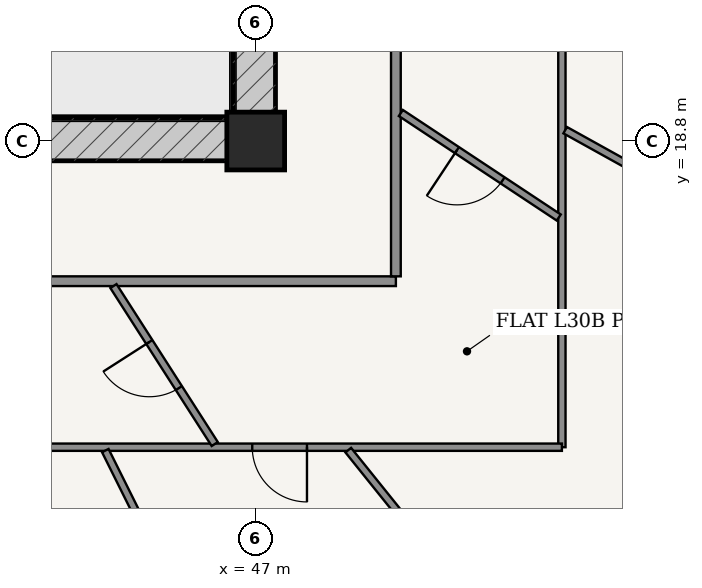
"""IFC4 building model, lengths in metres.
Left out: names, types, materials, properties, quantities, classifications, styles, units other than length and angle.
Written with IfcOpenShell. Run it as: python <this file> out.ifc"""

import sys

from ifc_helpers import new_model, si_unit, direction, frame, frame_2d, origin, origin_2d, place, context, subcontext, project, spatial, rectangle, extrude, source, transform, mapped, element, fill, save


model = new_model("IFC4")
c1 = context("Model", 3, precision=1e-05, world=origin(), true_north=direction((-0.2419218956, 0.970295726276)))
c2 = subcontext(c1, "Body", "Model", "MODEL_VIEW")
j1 = project(units=[si_unit("LENGTHUNIT", "METRE"), si_unit("PLANEANGLEUNIT", "RADIAN")], contexts=[c1])
p1 = place(None, origin())
s1 = spatial("IfcSite", under=j1, at=p1, CompositionType="ELEMENT")
p2 = place(p1, origin())
s2 = spatial("IfcBuilding", under=s1, at=p2, CompositionType="ELEMENT")
p3 = place(p2, frame((0.0, 0.0, 115.8)))
s3 = spatial("IfcBuildingStorey", under=s2, at=p3, CompositionType="ELEMENT", Elevation=115.8)
p4 = place(p3, frame((47.0, 18.8, 0.0), z_axis=(0.0, 0.0, 1.0), x_axis=(1.0, 0.0, 0.0)))
e1 = element("IfcColumn", 1, at=p4, inside=s3, PredefinedType="COLUMN", context=c2, shape_type="SweptSolid", body=[
    extrude(rectangle(XDim=0.95, YDim=0.95, at=origin_2d()), origin(), (0.0, 0.0, 1.0), 3.6),
])
p5 = place(p3, frame((28.675, 18.825, 0.0), z_axis=(0.0, 0.0, 1.0), x_axis=(1.0, 0.0, 0.0)))
e2 = element("IfcWall", 2, at=p5, inside=s3, PredefinedType="SHEAR", context=c2, shape_type="SweptSolid", body=[
    extrude(rectangle(XDim=18.65, YDim=0.7, at=frame_2d((9.325, 0.0))), origin(), (0.0, 0.0, 1.0), 3.325),
])
p6 = place(p5, frame((7.577, 0.0, 0.0)))
e3 = element("IfcOpeningElement", 3, at=p6, cuts=e2, PredefinedType="OPENING", context=c2, shape_type="SweptSolid", body=[
    extrude(rectangle(XDim=0.85, YDim=2.1, at=frame_2d((0.425, 1.05))), frame((0.0, 0.36, 0.0), z_axis=(0.0, -1.0, 0.0), x_axis=(1.0, 0.0, 0.0)), (0.0, 0.0, 1.0), 0.72),
])
p7 = place(p5, frame((10.623, 0.0, 0.0)))
e4 = element("IfcOpeningElement", 4, at=p7, cuts=e2, PredefinedType="OPENING", context=c2, shape_type="SweptSolid", body=[
    extrude(rectangle(XDim=0.85, YDim=2.1, at=frame_2d((0.425, 1.05))), frame((0.0, 0.36, 0.0), z_axis=(0.0, -1.0, 0.0), x_axis=(1.0, 0.0, 0.0)), (0.0, 0.0, 1.0), 0.72),
])
p8 = place(p3, frame((46.975, 19.175, 0.0), z_axis=(0.0, 0.0, 1.0), x_axis=(0.0, 1.0, 0.0)))
e5 = element("IfcWall", 5, at=p8, inside=s3, PredefinedType="SHEAR", context=c2, shape_type="SweptSolid", body=[
    extrude(rectangle(XDim=15.25, YDim=0.7, at=frame_2d((7.625, 0.0))), origin(), (0.0, 0.0, 1.0), 3.325),
])
p9 = place(p8, frame((9.875, 0.0, 0.0)))
e6 = element("IfcOpeningElement", 6, at=p9, cuts=e5, PredefinedType="OPENING", context=c2, shape_type="SweptSolid", body=[
    extrude(rectangle(XDim=1.5, YDim=2.2, at=frame_2d((0.75, 1.1))), frame((0.0, 0.36, 0.0), z_axis=(0.0, -1.0, 0.0), x_axis=(1.0, 0.0, 0.0)), (0.0, 0.0, 1.0), 0.72),
])
p10 = place(p3, frame((52.7, 8.398, 0.0), z_axis=(0.0, 0.0, 1.0), x_axis=(0.769254958887, 0.638941944333, 0.0)))
e7 = element("IfcWall", 7, at=p10, inside=s3, PredefinedType="SOLIDWALL", context=c2, shape_type="SweptSolid", body=[
    extrude(rectangle(XDim=9.69, YDim=0.28, at=frame_2d((4.845, 0.0))), origin(), (0.0, 0.0, 1.0), 3.325),
])
p11 = place(p10, frame((1.566, 0.0, 0.85)))
e8 = element("IfcOpeningElement", 8, at=p11, cuts=e7, PredefinedType="OPENING", context=c2, shape_type="SweptSolid", body=[
    extrude(rectangle(XDim=2.1, YDim=1.95, at=frame_2d((1.05, 0.975))), frame((0.0, 0.15, 0.0), z_axis=(0.0, -1.0, 0.0), x_axis=(1.0, 0.0, 0.0)), (0.0, 0.0, 1.0), 0.3),
])
p12 = place(p10, frame((6.023, 0.0, 0.85)))
e9 = element("IfcOpeningElement", 9, at=p12, cuts=e7, PredefinedType="OPENING", context=c2, shape_type="SweptSolid", body=[
    extrude(rectangle(XDim=2.1, YDim=1.95, at=frame_2d((1.05, 0.975))), frame((0.0, 0.15, 0.0), z_axis=(0.0, -1.0, 0.0), x_axis=(1.0, 0.0, 0.0)), (0.0, 0.0, 1.0), 0.3),
])
p13 = place(p3, frame((26.695, 16.495, 0.0), z_axis=(0.0, 0.0, 1.0), x_axis=(1.0, 0.0, 0.0)))
e10 = element("IfcWall", 10, at=p13, inside=s3, PredefinedType="PARTITIONING", context=c2, shape_type="SweptSolid", body=[
    extrude(rectangle(XDim=22.61, YDim=0.16, at=frame_2d((11.305, 0.0))), origin(), (0.0, 0.0, 1.0), 2.767),
])
p14 = place(p3, frame((49.305, 16.575, 0.0), z_axis=(0.0, 0.0, 1.0), x_axis=(0.0, 1.0, 0.0)))
e11 = element("IfcWall", 11, at=p14, inside=s3, PredefinedType="PARTITIONING", context=c2, shape_type="SweptSolid", body=[
    extrude(rectangle(XDim=20.45, YDim=0.16, at=frame_2d((10.225, 0.0))), origin(), (0.0, 0.0, 1.0), 2.767),
])
p15 = place(p14, frame((17.046, 0.0, 0.0)))
e12 = element("IfcOpeningElement", 12, at=p15, cuts=e11, PredefinedType="OPENING", context=c2, shape_type="SweptSolid", body=[
    extrude(rectangle(XDim=0.98, YDim=2.2, at=frame_2d((0.49, 1.1))), frame((0.0, 0.09, 0.0), z_axis=(0.0, -1.0, 0.0), x_axis=(1.0, 0.0, 0.0)), (0.0, 0.0, 1.0), 0.18),
])
p16 = place(p3, frame((52.035, 39.835, 0.0), z_axis=(0.0, 0.0, 1.0), x_axis=(0.0, -1.0, 0.0)))
e13 = element("IfcWall", 13, at=p16, inside=s3, PredefinedType="PARTITIONING", context=c2, shape_type="SweptSolid", body=[
    extrude(rectangle(XDim=26.07, YDim=0.12, at=frame_2d((13.035, 0.0))), origin(), (0.0, 0.0, 1.0), 2.767),
])
p17 = place(p16, frame((3.362, 0.0, 0.0)))
e14 = element("IfcOpeningElement", 14, at=p17, cuts=e13, PredefinedType="OPENING", context=c2, shape_type="SweptSolid", body=[
    extrude(rectangle(XDim=0.9, YDim=2.15, at=frame_2d((0.45, 1.075))), frame((0.0, 0.07, 0.0), z_axis=(0.0, -1.0, 0.0), x_axis=(1.0, 0.0, 0.0)), (0.0, 0.0, 1.0), 0.14),
])
p18 = place(p16, frame((13.924, 0.0, 0.0)))
e15 = element("IfcOpeningElement", 15, at=p18, cuts=e13, PredefinedType="OPENING", context=c2, shape_type="SweptSolid", body=[
    extrude(rectangle(XDim=0.9, YDim=2.15, at=frame_2d((0.45, 1.075))), frame((0.0, 0.07, 0.0), z_axis=(0.0, -1.0, 0.0), x_axis=(1.0, 0.0, 0.0)), (0.0, 0.0, 1.0), 0.14),
])
p19 = place(p3, frame((52.035, 13.765, 0.0), z_axis=(0.0, 0.0, 1.0), x_axis=(-1.0, 0.0, 0.0)))
e16 = element("IfcWall", 16, at=p19, inside=s3, PredefinedType="PARTITIONING", context=c2, shape_type="SweptSolid", body=[
    extrude(rectangle(XDim=24.416, YDim=0.12, at=frame_2d((12.208, 0.0))), origin(), (0.0, 0.0, 1.0), 2.767),
])
p20 = place(p19, frame((4.192, 0.0, 0.0)))
e17 = element("IfcOpeningElement", 17, at=p20, cuts=e16, PredefinedType="OPENING", context=c2, shape_type="SweptSolid", body=[
    extrude(rectangle(XDim=0.9, YDim=2.15, at=frame_2d((0.45, 1.075))), frame((0.0, 0.07, 0.0), z_axis=(0.0, -1.0, 0.0), x_axis=(1.0, 0.0, 0.0)), (0.0, 0.0, 1.0), 0.14),
])
p21 = place(p19, frame((19.728, 0.0, 0.0)))
e18 = element("IfcOpeningElement", 18, at=p21, cuts=e16, PredefinedType="OPENING", context=c2, shape_type="SweptSolid", body=[
    extrude(rectangle(XDim=0.86, YDim=2.15, at=frame_2d((0.43, 1.075))), frame((0.0, 0.07, 0.0), z_axis=(0.0, -1.0, 0.0), x_axis=(1.0, 0.0, 0.0)), (0.0, 0.0, 1.0), 0.14),
])
p22 = place(p3, frame((44.526, 13.709, 0.0), z_axis=(0.0, 0.0, 1.0), x_axis=(0.446179583353, -0.894943450392, 0.0)))
e19 = element("IfcWall", 19, at=p22, inside=s3, PredefinedType="PARTITIONING", context=c2, shape_type="SweptSolid", body=[
    extrude(rectangle(XDim=8.125, YDim=0.12, at=frame_2d((4.062, 0.0))), origin(), (0.0, 0.0, 1.0), 2.767),
])
p23 = place(p22, frame((3.612, 0.0, 0.0)))
e20 = element("IfcOpeningElement", 20, at=p23, cuts=e19, PredefinedType="OPENING", context=c2, shape_type="SweptSolid", body=[
    extrude(rectangle(XDim=0.9, YDim=2.15, at=frame_2d((0.45, 1.075))), frame((0.0, 0.07, 0.0), z_axis=(0.0, -1.0, 0.0), x_axis=(1.0, 0.0, 0.0)), (0.0, 0.0, 1.0), 0.14),
])
p24 = place(p3, frame((48.522, 13.717, 0.0), z_axis=(0.0, 0.0, 1.0), x_axis=(0.626707979732, -0.77925419995, 0.0)))
e21 = element("IfcWall", 21, at=p24, inside=s3, PredefinedType="PARTITIONING", context=c2, shape_type="SweptSolid", body=[
    extrude(rectangle(XDim=6.679, YDim=0.12, at=frame_2d((3.339, 0.0))), origin(), (0.0, 0.0, 1.0), 2.767),
])
p25 = place(p24, frame((1.821, 0.0, 0.0)))
e22 = element("IfcOpeningElement", 22, at=p25, cuts=e21, PredefinedType="OPENING", context=c2, shape_type="SweptSolid", body=[
    extrude(rectangle(XDim=0.9, YDim=2.15, at=frame_2d((0.45, 1.075))), frame((0.0, 0.07, 0.0), z_axis=(0.0, -1.0, 0.0), x_axis=(1.0, 0.0, 0.0)), (0.0, 0.0, 1.0), 0.14),
])
p26 = place(p3, frame((52.089, 18.979, 0.0), z_axis=(0.0, 0.0, 1.0), x_axis=(0.874313476423, -0.485361664066, 0.0)))
e23 = element("IfcWall", 23, at=p26, inside=s3, PredefinedType="PARTITIONING", context=c2, shape_type="SweptSolid", body=[
    extrude(rectangle(XDim=9.066, YDim=0.12, at=frame_2d((4.533, 0.0))), origin(), (0.0, 0.0, 1.0), 2.767),
])
p27 = place(p3, frame((52.094, 21.95, 0.0), z_axis=(0.0, 0.0, 1.0), x_axis=(0.945573120726, -0.32540970078, 0.0)))
e24 = element("IfcWall", 24, at=p27, inside=s3, PredefinedType="PARTITIONING", context=c2, shape_type="SweptSolid", body=[
    extrude(rectangle(XDim=11.022, YDim=0.12, at=frame_2d((5.511, 0.0))), origin(), (0.0, 0.0, 1.0), 2.767),
])
p28 = place(p27, frame((5.061, 0.0, 0.0)))
e25 = element("IfcOpeningElement", 25, at=p28, cuts=e24, PredefinedType="OPENING", context=c2, shape_type="SweptSolid", body=[
    extrude(rectangle(XDim=0.9, YDim=2.15, at=frame_2d((0.45, 1.075))), frame((0.0, 0.07, 0.0), z_axis=(0.0, -1.0, 0.0), x_axis=(1.0, 0.0, 0.0)), (0.0, 0.0, 1.0), 0.14),
])
p29 = place(p3, frame((44.66, 16.415, 0.0), z_axis=(0.0, 0.0, 1.0), x_axis=(0.539825682796, -0.841776830397, 0.0)))
e26 = element("IfcWall", 26, at=p29, inside=s3, PredefinedType="PARTITIONING", context=c2, shape_type="SweptSolid", body=[
    extrude(rectangle(XDim=3.086, YDim=0.12, at=frame_2d((1.543, 0.0))), origin(), (0.0, 0.0, 1.0), 3.325),
])
p30 = place(p29, frame((1.093, 0.0, 0.0)))
e27 = element("IfcOpeningElement", 27, at=p30, cuts=e26, PredefinedType="OPENING", context=c2, shape_type="SweptSolid", body=[
    extrude(rectangle(XDim=0.9, YDim=2.15, at=frame_2d((0.45, 1.075))), frame((0.0, 0.07, 0.0), z_axis=(0.0, -1.0, 0.0), x_axis=(1.0, 0.0, 0.0)), (0.0, 0.0, 1.0), 0.14),
])
p31 = place(p3, frame((49.387, 19.261, 0.0), z_axis=(0.0, 0.0, 1.0), x_axis=(0.833806969544, -0.552056099993, 0.0)))
e28 = element("IfcWall", 28, at=p31, inside=s3, PredefinedType="PARTITIONING", context=c2, shape_type="SweptSolid", body=[
    extrude(rectangle(XDim=3.114, YDim=0.12, at=frame_2d((1.557, 0.0))), origin(), (0.0, 0.0, 1.0), 3.325),
])
p32 = place(p31, frame((1.107, 0.0, 0.0)))
e29 = element("IfcOpeningElement", 29, at=p32, cuts=e28, PredefinedType="OPENING", context=c2, shape_type="SweptSolid", body=[
    extrude(rectangle(XDim=0.9, YDim=2.15, at=frame_2d((0.45, 1.075))), frame((0.0, 0.07, 0.0), z_axis=(0.0, -1.0, 0.0), x_axis=(1.0, 0.0, 0.0)), (0.0, 0.0, 1.0), 0.14),
])
m1 = source(origin(), c2, "Body", "SweptSolid", [
    extrude(rectangle(XDim=0.9, YDim=2.15, at=frame_2d((0.45, 1.075))), frame((0.0, 0.025, 0.0), z_axis=(0.0, -1.0, 0.0), x_axis=(1.0, 0.0, 0.0)), (0.0, 0.0, 1.0), 0.05),
])
p33 = place(p32, frame((0.9, 0.0, 0.0), z_axis=(0.0, 0.0, 1.0), x_axis=(-1.0, 0.0, 0.0)))
e30 = element("IfcDoor", 30, at=p33, inside=s3, OperationType="SINGLE_SWING_RIGHT", PredefinedType="DOOR", context=c2, shape_type="MappedRepresentation", body=[
    mapped(m1, transform((0.0, 0.0, 0.0), scale=1.0)),
])
fill(e29, e30)
p34 = place(p20, origin())
e31 = element("IfcDoor", 31, at=p34, inside=s3, OperationType="SINGLE_SWING_LEFT", PredefinedType="DOOR", context=c2, shape_type="MappedRepresentation", body=[
    mapped(m1, transform((0.0, 0.0, 0.0), scale=1.0)),
])
fill(e17, e31)
p35 = place(p30, frame((0.9, 0.0, 0.0), z_axis=(0.0, 0.0, 1.0), x_axis=(-1.0, 0.0, 0.0)))
e32 = element("IfcDoor", 32, at=p35, inside=s3, OperationType="SINGLE_SWING_RIGHT", PredefinedType="DOOR", context=c2, shape_type="MappedRepresentation", body=[
    mapped(m1, transform((0.0, 0.0, 0.0), scale=1.0)),
])
fill(e27, e32)
save(model, sys.argv[1])
